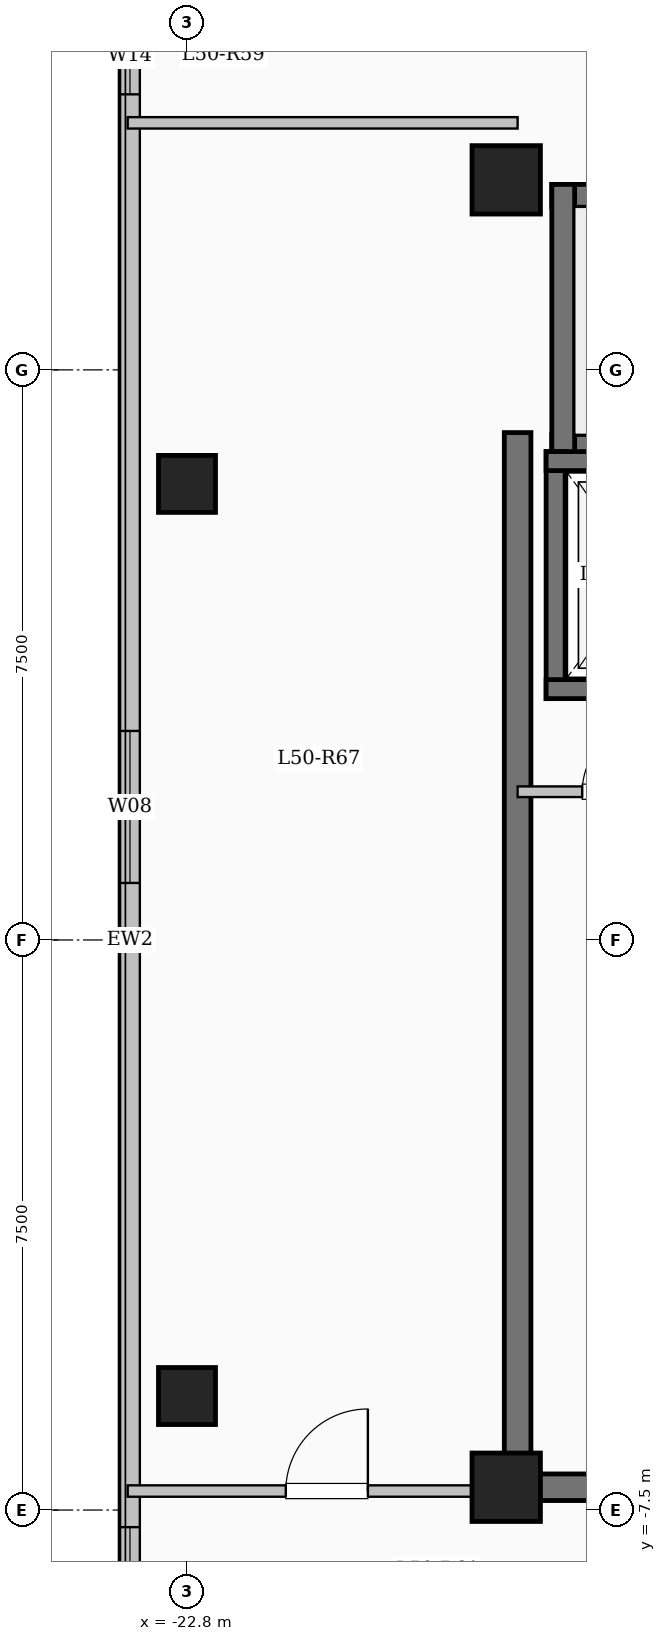
"""IFC4 building model, lengths in metres.
Left out: names, types, materials, properties, quantities, classifications, styles, units other than length and angle.
Written with IfcOpenShell. Run it as: python <this file> out.ifc"""

import sys

from ifc_helpers import new_model, si_unit, direction, frame, frame_2d, origin, origin_2d, place, context, subcontext, project, spatial, rectangle, extrude, element, fill, save


model = new_model("IFC4")
c1 = context("Model", 3, precision=1e-05, world=origin(), true_north=direction((0.0, 1.0)))
c2 = subcontext(c1, "Body", "Model", "MODEL_VIEW")
j1 = project(units=[si_unit("LENGTHUNIT", "METRE"), si_unit("PLANEANGLEUNIT", "RADIAN")], contexts=[c1])
p1 = place(None, origin())
s1 = spatial("IfcSite", under=j1, at=p1, CompositionType="ELEMENT")
p2 = place(p1, origin())
s2 = spatial("IfcBuilding", under=s1, at=p2, CompositionType="ELEMENT")
p3 = place(p2, frame((0.0, 0.0, 186.9)))
s3 = spatial("IfcBuildingStorey", under=s2, at=p3, CompositionType="ELEMENT", Elevation=186.9)
for number, where, z_axis, x_axis in (
    (1, (-18.6, -7.2, 0.0), (0.0, 0.0, 1.0), (1.0, 0.0, 0.0)),
    (2, (-18.6, 10.0, 0.0), (0.0, 0.0, 1.0), (1.0, 0.0, 0.0)),
):
    element("IfcColumn", number, at=place(p3, frame(where, z_axis=z_axis, x_axis=x_axis)), inside=s3, PredefinedType="COLUMN", context=c2, shape_type="SweptSolid", body=[
        extrude(rectangle(XDim=0.9, YDim=0.9, at=origin_2d()), origin(), (0.0, 0.0, 1.0), 3.35),
    ])
for number, where, z_axis, x_axis in (
    (3, (-22.8, -6.0, 0.0), (0.0, 0.0, 1.0), (1.0, 0.0, 0.0)),
    (4, (-22.8, 6.0, 0.0), (0.0, 0.0, 1.0), (1.0, 0.0, 0.0)),
):
    element("IfcColumn", number, at=place(p3, frame(where, z_axis=z_axis, x_axis=x_axis)), inside=s3, PredefinedType="COLUMN", context=c2, shape_type="SweptSolid", body=[
        extrude(rectangle(XDim=0.75, YDim=0.75, at=origin_2d()), origin(), (0.0, 0.0, 1.0), 3.35),
    ])
p4 = place(p3, frame((-23.55, -17.25, 0.0), z_axis=(0.0, 0.0, 1.0), x_axis=(0.0, 1.0, 0.0)))
e5 = element("IfcWall", 5, at=p4, inside=s3, PredefinedType="SOLIDWALL", context=c2, shape_type="SweptSolid", body=[
    extrude(rectangle(XDim=34.5, YDim=0.26, at=frame_2d((17.25, 0.0))), origin(), (0.0, 0.0, 1.0), 3.1),
])
p5 = place(p4, frame((2.825, 0.0, 0.9)))
e6 = element("IfcOpeningElement", 6, at=p5, cuts=e5, PredefinedType="OPENING", context=c2, shape_type="SweptSolid", body=[
    extrude(rectangle(XDim=2.2, YDim=1.75, at=frame_2d((1.1, 0.875))), frame((0.0, 0.14, 0.0), z_axis=(0.0, -1.0, 0.0), x_axis=(1.0, 0.0, 0.0)), (0.0, 0.0, 1.0), 0.28),
])
p6 = place(p4, frame((8.325, 0.0, 0.95)))
e7 = element("IfcOpeningElement", 7, at=p6, cuts=e5, PredefinedType="OPENING", context=c2, shape_type="SweptSolid", body=[
    extrude(rectangle(XDim=1.2, YDim=1.5, at=frame_2d((0.6, 0.75))), frame((0.0, 0.14, 0.0), z_axis=(0.0, -1.0, 0.0), x_axis=(1.0, 0.0, 0.0)), (0.0, 0.0, 1.0), 0.28),
])
p7 = place(p4, frame((18.0, 0.0, 0.9)))
e8 = element("IfcOpeningElement", 8, at=p7, cuts=e5, PredefinedType="OPENING", context=c2, shape_type="SweptSolid", body=[
    extrude(rectangle(XDim=2.0, YDim=1.7, at=frame_2d((1.0, 0.85))), frame((0.0, 0.14, 0.0), z_axis=(0.0, -1.0, 0.0), x_axis=(1.0, 0.0, 0.0)), (0.0, 0.0, 1.0), 0.28),
])
p8 = place(p4, frame((28.375, 0.0, 0.95)))
e9 = element("IfcOpeningElement", 9, at=p8, cuts=e5, PredefinedType="OPENING", context=c2, shape_type="SweptSolid", body=[
    extrude(rectangle(XDim=1.0, YDim=1.5, at=frame_2d((0.5, 0.75))), frame((0.0, 0.14, 0.0), z_axis=(0.0, -1.0, 0.0), x_axis=(1.0, 0.0, 0.0)), (0.0, 0.0, 1.0), 0.28),
])
p9 = place(p4, frame((31.125, 0.0, 0.9)))
e10 = element("IfcOpeningElement", 10, at=p9, cuts=e5, PredefinedType="OPENING", context=c2, shape_type="SweptSolid", body=[
    extrude(rectangle(XDim=2.0, YDim=1.7, at=frame_2d((1.0, 0.85))), frame((0.0, 0.14, 0.0), z_axis=(0.0, -1.0, 0.0), x_axis=(1.0, 0.0, 0.0)), (0.0, 0.0, 1.0), 0.28),
])
p10 = place(p3, frame((-18.0, 9.79, 0.0), z_axis=(0.0, 0.0, 1.0), x_axis=(1.0, 0.0, 0.0)))
e11 = element("IfcWall", 11, at=p10, inside=s3, PredefinedType="SHEAR", context=c2, shape_type="SweptSolid", body=[
    extrude(rectangle(XDim=8.0, YDim=0.3, at=frame_2d((4.0, 0.0))), origin(), (0.0, 0.0, 1.0), 3.35),
])
p11 = place(p3, frame((-18.0, 6.5, 0.0), z_axis=(0.0, 0.0, 1.0), x_axis=(1.0, 0.0, 0.0)))
e12 = element("IfcWall", 12, at=p11, inside=s3, PredefinedType="SHEAR", context=c2, shape_type="SweptSolid", body=[
    extrude(rectangle(XDim=8.0, YDim=0.3, at=frame_2d((4.0, 0.0))), origin(), (0.0, 0.0, 1.0), 3.35),
])
p12 = place(p11, frame((6.45, 0.0, 0.0)))
e13 = element("IfcOpeningElement", 13, at=p12, cuts=e12, PredefinedType="OPENING", context=c2, shape_type="SweptSolid", body=[
    extrude(rectangle(XDim=1.0, YDim=2.15, at=frame_2d((0.5, 1.075))), frame((0.0, 0.16, 0.0), z_axis=(0.0, -1.0, 0.0), x_axis=(1.0, 0.0, 0.0)), (0.0, 0.0, 1.0), 0.32),
])
p13 = place(p3, frame((-17.85, 6.35, 0.0), z_axis=(0.0, 0.0, 1.0), x_axis=(0.0, 1.0, 0.0)))
e14 = element("IfcWall", 14, at=p13, inside=s3, PredefinedType="SHEAR", context=c2, shape_type="SweptSolid", body=[
    extrude(rectangle(XDim=3.59, YDim=0.3, at=frame_2d((1.795, 0.0))), origin(), (0.0, 0.0, 1.0), 3.35),
])
p14 = place(p3, frame((-17.95, 3.175, 0.0), z_axis=(0.0, 0.0, 1.0), x_axis=(0.0, 1.0, 0.0)))
e15 = element("IfcWall", 15, at=p14, inside=s3, PredefinedType="SHEAR", context=c2, shape_type="SweptSolid", body=[
    extrude(rectangle(XDim=3.25, YDim=0.25, at=frame_2d((1.625, 0.0))), origin(), (0.0, 0.0, 1.0), 3.35),
])
for number, where, z_axis, x_axis in (
    (16, (-18.075, 3.3, 0.0), (0.0, 0.0, 1.0), (1.0, 0.0, 0.0)),
    (17, (-18.075, 6.3, 0.0), (0.0, 0.0, 1.0), (1.0, 0.0, 0.0)),
):
    element("IfcWall", number, at=place(p3, frame(where, z_axis=z_axis, x_axis=x_axis)), inside=s3, PredefinedType="SHEAR", context=c2, shape_type="SweptSolid", body=[
        extrude(rectangle(XDim=2.55, YDim=0.25, at=frame_2d((1.275, 0.0))), origin(), (0.0, 0.0, 1.0), 3.35),
    ])
p15 = place(p3, frame((-18.45, -7.375, 0.0), z_axis=(0.0, 0.0, 1.0), x_axis=(0.0, 1.0, 0.0)))
e18 = element("IfcWall", 18, at=p15, inside=s3, PredefinedType="SHEAR", context=c2, shape_type="SweptSolid", body=[
    extrude(rectangle(XDim=14.05, YDim=0.35, at=frame_2d((7.025, 0.0))), origin(), (0.0, 0.0, 1.0), 3.35),
])
p16 = place(p3, frame((-18.625, -7.2, 0.0), z_axis=(0.0, 0.0, 1.0), x_axis=(1.0, 0.0, 0.0)))
e19 = element("IfcWall", 19, at=p16, inside=s3, PredefinedType="SHEAR", context=c2, shape_type="SweptSolid", body=[
    extrude(rectangle(XDim=8.55, YDim=0.35, at=frame_2d((4.275, 0.0))), origin(), (0.0, 0.0, 1.0), 3.35),
])
p17 = place(p16, frame((1.725, 0.0, 0.0)))
e20 = element("IfcOpeningElement", 20, at=p17, cuts=e19, PredefinedType="OPENING", context=c2, shape_type="SweptSolid", body=[
    extrude(rectangle(XDim=1.12, YDim=2.15, at=frame_2d((0.56, 1.075))), frame((0.0, 0.185, 0.0), z_axis=(0.0, -1.0, 0.0), x_axis=(1.0, 0.0, 0.0)), (0.0, 0.0, 1.0), 0.37),
])
p18 = place(p3, frame((-18.45, 1.95, 0.0), z_axis=(0.0, 0.0, 1.0), x_axis=(1.0, 0.0, 0.0)))
e21 = element("IfcWall", 21, at=p18, inside=s3, PredefinedType="PARTITIONING", context=c2, shape_type="SweptSolid", body=[
    extrude(rectangle(XDim=3.15, YDim=0.14, at=frame_2d((1.575, 0.0))), origin(), (0.0, 0.0, 1.0), 3.1),
])
p19 = place(p18, frame((0.85, 0.0, 0.0)))
e22 = element("IfcOpeningElement", 22, at=p19, cuts=e21, PredefinedType="OPENING", context=c2, shape_type="SweptSolid", body=[
    extrude(rectangle(XDim=0.9, YDim=2.08, at=frame_2d((0.45, 1.04))), frame((0.0, 0.08, 0.0), z_axis=(0.0, -1.0, 0.0), x_axis=(1.0, 0.0, 0.0)), (0.0, 0.0, 1.0), 0.16),
])
p20 = place(p3, frame((-23.58, -7.25, 0.0), z_axis=(0.0, 0.0, 1.0), x_axis=(1.0, 0.0, 0.0)))
e23 = element("IfcWall", 23, at=p20, inside=s3, PredefinedType="PARTITIONING", context=c2, shape_type="SweptSolid", body=[
    extrude(rectangle(XDim=5.13, YDim=0.15, at=frame_2d((2.565, 0.0))), origin(), (0.0, 0.0, 1.0), 3.1),
])
p21 = place(p20, frame((2.08, 0.0, 0.0)))
e24 = element("IfcOpeningElement", 24, at=p21, cuts=e23, PredefinedType="OPENING", context=c2, shape_type="SweptSolid", body=[
    extrude(rectangle(XDim=1.08, YDim=2.15, at=frame_2d((0.54, 1.075))), frame((0.0, 0.085, 0.0), z_axis=(0.0, -1.0, 0.0), x_axis=(1.0, 0.0, 0.0)), (0.0, 0.0, 1.0), 0.17),
])
p22 = place(p3, frame((-23.58, 10.75, 0.0), z_axis=(0.0, 0.0, 1.0), x_axis=(1.0, 0.0, 0.0)))
e25 = element("IfcWall", 25, at=p22, inside=s3, PredefinedType="PARTITIONING", context=c2, shape_type="SweptSolid", body=[
    extrude(rectangle(XDim=5.13, YDim=0.15, at=frame_2d((2.565, 0.0))), origin(), (0.0, 0.0, 1.0), 3.1),
])
p23 = place(p6, origin())
e26 = element("IfcWindow", 26, at=p23, inside=s3, PartitioningType="SINGLE_PANEL", PredefinedType="WINDOW", context=c2, shape_type="SweptSolid", body=[
    extrude(rectangle(XDim=1.2, YDim=1.5, at=frame_2d((0.6, 0.75))), frame((0.0, 0.03, 0.0), z_axis=(0.0, -1.0, 0.0), x_axis=(1.0, 0.0, 0.0)), (0.0, 0.0, 1.0), 0.06),
])
fill(e7, e26)
p24 = place(p7, origin())
e27 = element("IfcWindow", 27, at=p24, inside=s3, PartitioningType="SINGLE_PANEL", PredefinedType="WINDOW", context=c2, shape_type="SweptSolid", body=[
    extrude(rectangle(XDim=2.0, YDim=1.7, at=frame_2d((1.0, 0.85))), frame((0.0, 0.03, 0.0), z_axis=(0.0, -1.0, 0.0), x_axis=(1.0, 0.0, 0.0)), (0.0, 0.0, 1.0), 0.06),
])
fill(e8, e27)
p25 = place(p8, origin())
e28 = element("IfcWindow", 28, at=p25, inside=s3, PartitioningType="SINGLE_PANEL", PredefinedType="WINDOW", context=c2, shape_type="SweptSolid", body=[
    extrude(rectangle(XDim=1.0, YDim=1.5, at=frame_2d((0.5, 0.75))), frame((0.0, 0.03, 0.0), z_axis=(0.0, -1.0, 0.0), x_axis=(1.0, 0.0, 0.0)), (0.0, 0.0, 1.0), 0.06),
])
fill(e9, e28)
p26 = place(p19, origin())
e29 = element("IfcDoor", 29, at=p26, inside=s3, OperationType="SINGLE_SWING_RIGHT", PredefinedType="DOOR", context=c2, shape_type="SweptSolid", body=[
    extrude(rectangle(XDim=0.9, YDim=2.08, at=frame_2d((0.45, 1.04))), frame((0.0, 0.025, 0.0), z_axis=(0.0, -1.0, 0.0), x_axis=(1.0, 0.0, 0.0)), (0.0, 0.0, 1.0), 0.05),
])
fill(e22, e29)
p27 = place(p21, origin())
e30 = element("IfcDoor", 30, at=p27, inside=s3, OperationType="SINGLE_SWING_RIGHT", PredefinedType="DOOR", context=c2, shape_type="SweptSolid", body=[
    extrude(rectangle(XDim=1.08, YDim=2.15, at=frame_2d((0.54, 1.075))), frame((0.0, 0.025, 0.0), z_axis=(0.0, -1.0, 0.0), x_axis=(1.0, 0.0, 0.0)), (0.0, 0.0, 1.0), 0.05),
])
fill(e24, e30)
save(model, sys.argv[1])
